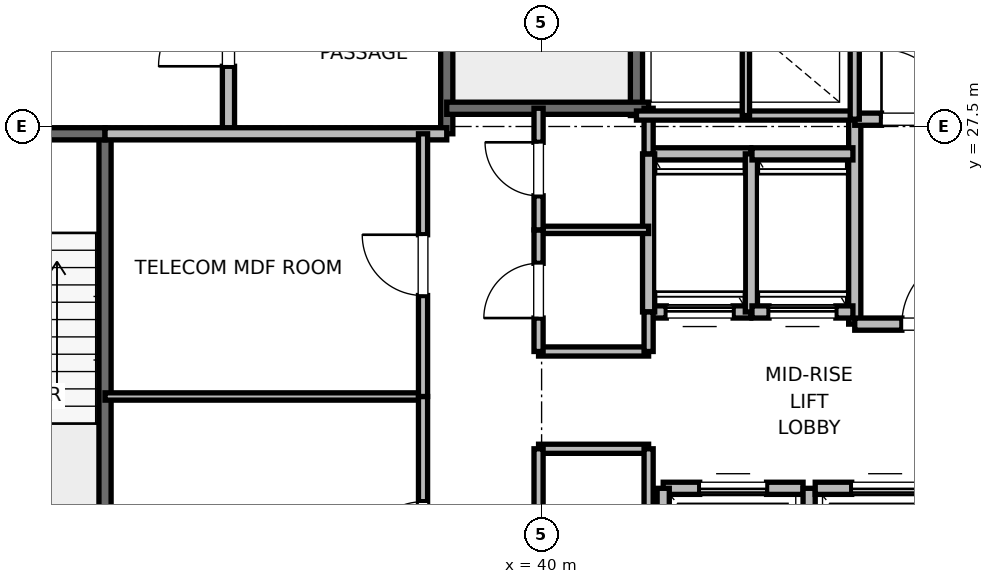
"""IFC4 building model, lengths in metres.
Left out: names, types, materials, properties, quantities, classifications, styles, units other than length and angle.
Written with IfcOpenShell. Run it as: python <this file> out.ifc"""

import sys

from ifc_helpers import new_model, si_unit, direction, frame, frame_2d, origin, place, context, subcontext, project, spatial, rectangle, extrude, element, fill, save


model = new_model("IFC4")
c1 = context("Model", 3, precision=1e-05, world=origin(), true_north=direction((0.0, 1.0)))
c2 = subcontext(c1, "Body", "Model", "MODEL_VIEW")
j1 = project(units=[si_unit("LENGTHUNIT", "METRE"), si_unit("PLANEANGLEUNIT", "RADIAN")], contexts=[c1])
p1 = place(None, origin())
s1 = spatial("IfcSite", under=j1, at=p1, CompositionType="ELEMENT")
p2 = place(p1, origin())
s2 = spatial("IfcBuilding", under=s1, at=p2, CompositionType="ELEMENT")
p3 = place(p2, frame((0.0, 0.0, 156.4)))
s3 = spatial("IfcBuildingStorey", under=s2, at=p3, CompositionType="ELEMENT", Elevation=156.4)
p4 = place(p3, frame((32.82, 18.6, 0.0), z_axis=(0.0, 0.0, 1.0), x_axis=(0.0, 1.0, 0.0)))
e1 = element("IfcWall", 1, at=p4, inside=s3, PredefinedType="SOLIDWALL", context=c2, shape_type="SweptSolid", body=[
    extrude(rectangle(XDim=8.78, YDim=0.2, at=frame_2d((4.39, 0.0))), origin(), (0.0, 0.0, 1.0), 3.775),
])
p5 = place(p3, frame((29.7, 27.38, 0.0), z_axis=(0.0, 0.0, 1.0), x_axis=(1.0, 0.0, 0.0)))
e2 = element("IfcWall", 2, at=p5, inside=s3, PredefinedType="SOLIDWALL", context=c2, shape_type="SweptSolid", body=[
    extrude(rectangle(XDim=3.12, YDim=0.2, at=frame_2d((1.56, 0.0))), origin(), (0.0, 0.0, 1.0), 3.775),
])
p6 = place(p5, frame((1.01, 0.0, 0.0)))
e3 = element("IfcOpeningElement", 3, at=p6, cuts=e2, PredefinedType="OPENING", context=c2, shape_type="SweptSolid", body=[
    extrude(rectangle(XDim=1.1, YDim=2.15, at=frame_2d((0.55, 1.075))), frame((0.0, 0.1, 0.0), z_axis=(0.0, -1.0, 0.0), x_axis=(1.0, 0.0, 0.0)), (0.0, 0.0, 1.0), 0.2),
])
p7 = place(p3, frame((38.44, 27.38, 0.0), z_axis=(0.0, 0.0, 1.0), x_axis=(0.0, 1.0, 0.0)))
e4 = element("IfcWall", 4, at=p7, inside=s3, PredefinedType="SOLIDWALL", context=c2, shape_type="SweptSolid", body=[
    extrude(rectangle(XDim=8.87, YDim=0.2, at=frame_2d((4.435, 0.0))), origin(), (0.0, 0.0, 1.0), 3.775),
])
p8 = place(p3, frame((41.56, 27.68, 0.0), z_axis=(0.0, 0.0, 1.0), x_axis=(0.0, 1.0, 0.0)))
e5 = element("IfcWall", 5, at=p8, inside=s3, PredefinedType="SOLIDWALL", context=c2, shape_type="SweptSolid", body=[
    extrude(rectangle(XDim=8.57, YDim=0.2, at=frame_2d((4.285, 0.0))), origin(), (0.0, 0.0, 1.0), 3.775),
])
p9 = place(p3, frame((38.44, 27.8, 0.0), z_axis=(0.0, 0.0, 1.0), x_axis=(1.0, 0.0, 0.0)))
e6 = element("IfcWall", 6, at=p9, inside=s3, PredefinedType="SOLIDWALL", context=c2, shape_type="SweptSolid", body=[
    extrude(rectangle(XDim=3.32, YDim=0.2, at=frame_2d((1.66, 0.0))), origin(), (0.0, 0.0, 1.0), 3.775),
])
p10 = place(p3, frame((34.85, 27.38, 0.0), z_axis=(0.0, 0.0, 1.0), x_axis=(0.0, 1.0, 0.0)))
e7 = element("IfcWall", 7, at=p10, inside=s3, PredefinedType="PARTITIONING", context=c2, shape_type="SweptSolid", body=[
    extrude(rectangle(XDim=3.37, YDim=0.2, at=frame_2d((1.685, 0.0))), origin(), (0.0, 0.0, 1.0), 3.775),
])
p11 = place(p10, frame((1.11, 0.0, 0.0)))
e8 = element("IfcOpeningElement", 8, at=p11, cuts=e7, PredefinedType="OPENING", context=c2, shape_type="SweptSolid", body=[
    extrude(rectangle(XDim=1.15, YDim=2.2, at=frame_2d((0.575, 1.1))), frame((0.0, 0.1, 0.0), z_axis=(0.0, -1.0, 0.0), x_axis=(1.0, 0.0, 0.0)), (0.0, 0.0, 1.0), 0.2),
])
p12 = place(p3, frame((32.82, 27.38, 0.0), z_axis=(0.0, 0.0, 1.0), x_axis=(1.0, 0.0, 0.0)))
e9 = element("IfcWall", 9, at=p12, inside=s3, PredefinedType="PARTITIONING", context=c2, shape_type="SweptSolid", body=[
    extrude(rectangle(XDim=5.62, YDim=0.2, at=frame_2d((2.81, 0.0))), origin(), (0.0, 0.0, 1.0), 3.775),
])
p13 = place(p3, frame((45.15, 24.25, 0.0), z_axis=(0.0, 0.0, 1.0), x_axis=(0.0, 1.0, 0.0)))
e10 = element("IfcWall", 10, at=p13, inside=s3, PredefinedType="PARTITIONING", context=c2, shape_type="SweptSolid", body=[
    extrude(rectangle(XDim=3.37, YDim=0.2, at=frame_2d((1.685, 0.0))), origin(), (0.0, 0.0, 1.0), 3.775),
])
p14 = place(p3, frame((45.15, 24.25, 0.0), z_axis=(0.0, 0.0, 1.0), x_axis=(1.0, 0.0, 0.0)))
e11 = element("IfcWall", 11, at=p14, inside=s3, PredefinedType="PARTITIONING", context=c2, shape_type="SweptSolid", body=[
    extrude(rectangle(XDim=2.7, YDim=0.2, at=frame_2d((1.35, 0.0))), origin(), (0.0, 0.0, 1.0), 3.775),
])
p15 = place(p14, frame((0.775, 0.0, 0.0)))
e12 = element("IfcOpeningElement", 12, at=p15, cuts=e11, PredefinedType="OPENING", context=c2, shape_type="SweptSolid", body=[
    extrude(rectangle(XDim=1.15, YDim=2.2, at=frame_2d((0.575, 1.1))), frame((0.0, 0.1, 0.0), z_axis=(0.0, -1.0, 0.0), x_axis=(1.0, 0.0, 0.0)), (0.0, 0.0, 1.0), 0.2),
])
p16 = place(p3, frame((45.15, 27.62, 0.0), z_axis=(0.0, 0.0, 1.0), x_axis=(1.0, 0.0, 0.0)))
e13 = element("IfcWall", 13, at=p16, inside=s3, PredefinedType="PARTITIONING", context=c2, shape_type="SweptSolid", body=[
    extrude(rectangle(XDim=2.03, YDim=0.2, at=frame_2d((1.015, 0.0))), origin(), (0.0, 0.0, 1.0), 3.775),
])
p17 = place(p16, frame((0.44, 0.0, 0.0)))
e14 = element("IfcOpeningElement", 14, at=p17, cuts=e13, PredefinedType="OPENING", context=c2, shape_type="SweptSolid", body=[
    extrude(rectangle(XDim=1.15, YDim=2.2, at=frame_2d((0.575, 1.1))), frame((0.0, 0.1, 0.0), z_axis=(0.0, -1.0, 0.0), x_axis=(1.0, 0.0, 0.0)), (0.0, 0.0, 1.0), 0.2),
])
p18 = place(p3, frame((44.3, 21.55, 0.0), z_axis=(0.0, 0.0, 1.0), x_axis=(-1.0, 0.0, 0.0)))
e15 = element("IfcWall", 15, at=p18, inside=s3, PredefinedType="SOLIDWALL", context=c2, shape_type="SweptSolid", body=[
    extrude(rectangle(XDim=2.3, YDim=0.2, at=frame_2d((1.15, 0.0))), origin(), (0.0, 0.0, 1.0), 3.775),
])
p19 = place(p18, frame((0.6, 0.0, 0.0)))
e16 = element("IfcOpeningElement", 16, at=p19, cuts=e15, PredefinedType="OPENING", context=c2, shape_type="SweptSolid", body=[
    extrude(rectangle(XDim=1.1, YDim=2.2, at=frame_2d((0.55, 1.1))), frame((0.0, 0.1, 0.0), z_axis=(0.0, -1.0, 0.0), x_axis=(1.0, 0.0, 0.0)), (0.0, 0.0, 1.0), 0.2),
])
p20 = place(p3, frame((42.0, 21.55, 0.0), z_axis=(0.0, 0.0, 1.0), x_axis=(0.0, -1.0, 0.0)))
e17 = element("IfcWall", 17, at=p20, inside=s3, PredefinedType="SOLIDWALL", context=c2, shape_type="SweptSolid", body=[
    extrude(rectangle(XDim=2.6, YDim=0.2, at=frame_2d((1.3, 0.0))), origin(), (0.0, 0.0, 1.0), 2.755),
])
p21 = place(p3, frame((44.4, 18.95, 0.0), z_axis=(0.0, 0.0, 1.0), x_axis=(0.0, 1.0, 0.0)))
e18 = element("IfcWall", 18, at=p21, inside=s3, PredefinedType="SOLIDWALL", context=c2, shape_type="SweptSolid", body=[
    extrude(rectangle(XDim=2.6, YDim=0.2, at=frame_2d((1.3, 0.0))), origin(), (0.0, 0.0, 1.0), 3.775),
])
p22 = place(p3, frame((46.8, 21.55, 0.0), z_axis=(0.0, 0.0, 1.0), x_axis=(-1.0, 0.0, 0.0)))
e19 = element("IfcWall", 19, at=p22, inside=s3, PredefinedType="SOLIDWALL", context=c2, shape_type="SweptSolid", body=[
    extrude(rectangle(XDim=2.3, YDim=0.2, at=frame_2d((1.15, 0.0))), origin(), (0.0, 0.0, 1.0), 3.775),
])
p23 = place(p22, frame((0.6, 0.0, 0.0)))
e20 = element("IfcOpeningElement", 20, at=p23, cuts=e19, PredefinedType="OPENING", context=c2, shape_type="SweptSolid", body=[
    extrude(rectangle(XDim=1.1, YDim=2.2, at=frame_2d((0.55, 1.1))), frame((0.0, 0.1, 0.0), z_axis=(0.0, -1.0, 0.0), x_axis=(1.0, 0.0, 0.0)), (0.0, 0.0, 1.0), 0.2),
])
p24 = place(p3, frame((41.76, 24.45, 0.0), z_axis=(0.0, 0.0, 1.0), x_axis=(1.0, 0.0, 0.0)))
e21 = element("IfcWall", 21, at=p24, inside=s3, PredefinedType="SOLIDWALL", context=c2, shape_type="SweptSolid", body=[
    extrude(rectangle(XDim=1.68, YDim=0.2, at=frame_2d((0.84, 0.0))), origin(), (0.0, 0.0, 1.0), 3.775),
])
p25 = place(p24, frame((0.29, 0.0, 0.0)))
e22 = element("IfcOpeningElement", 22, at=p25, cuts=e21, PredefinedType="OPENING", context=c2, shape_type="SweptSolid", body=[
    extrude(rectangle(XDim=1.1, YDim=2.2, at=frame_2d((0.55, 1.1))), frame((0.0, 0.1, 0.0), z_axis=(0.0, -1.0, 0.0), x_axis=(1.0, 0.0, 0.0)), (0.0, 0.0, 1.0), 0.2),
])
p26 = place(p3, frame((43.44, 27.05, 0.0), z_axis=(0.0, 0.0, 1.0), x_axis=(-1.0, 0.0, 0.0)))
e23 = element("IfcWall", 23, at=p26, inside=s3, PredefinedType="SOLIDWALL", context=c2, shape_type="SweptSolid", body=[
    extrude(rectangle(XDim=1.68, YDim=0.2, at=frame_2d((0.84, 0.0))), origin(), (0.0, 0.0, 1.0), 3.775),
])
for number, where, z_axis, x_axis in (
    (24, (41.76, 27.05, 0.0), (0.0, 0.0, 1.0), (0.0, -1.0, 0.0)),
    (25, (43.45, 24.45, 0.0), (0.0, 0.0, 1.0), (0.0, 1.0, 0.0)),
):
    element("IfcWall", number, at=place(p3, frame(where, z_axis=z_axis, x_axis=x_axis)), inside=s3, PredefinedType="SOLIDWALL", context=c2, shape_type="SweptSolid", body=[
        extrude(rectangle(XDim=2.6, YDim=0.2, at=frame_2d((1.3, 0.0))), origin(), (0.0, 0.0, 1.0), 3.775),
    ])
p27 = place(p3, frame((43.46, 24.45, 0.0), z_axis=(0.0, 0.0, 1.0), x_axis=(1.0, 0.0, 0.0)))
e26 = element("IfcWall", 26, at=p27, inside=s3, PredefinedType="SOLIDWALL", context=c2, shape_type="SweptSolid", body=[
    extrude(rectangle(XDim=1.66, YDim=0.2, at=frame_2d((0.83, 0.0))), origin(), (0.0, 0.0, 1.0), 3.775),
])
p28 = place(p27, frame((0.28, 0.0, 0.0)))
e27 = element("IfcOpeningElement", 27, at=p28, cuts=e26, PredefinedType="OPENING", context=c2, shape_type="SweptSolid", body=[
    extrude(rectangle(XDim=1.1, YDim=2.2, at=frame_2d((0.55, 1.1))), frame((0.0, 0.1, 0.0), z_axis=(0.0, -1.0, 0.0), x_axis=(1.0, 0.0, 0.0)), (0.0, 0.0, 1.0), 0.2),
])
p29 = place(p3, frame((45.12, 27.05, 0.0), z_axis=(0.0, 0.0, 1.0), x_axis=(-1.0, 0.0, 0.0)))
e28 = element("IfcWall", 28, at=p29, inside=s3, PredefinedType="SOLIDWALL", context=c2, shape_type="SweptSolid", body=[
    extrude(rectangle(XDim=1.66, YDim=0.2, at=frame_2d((0.83, 0.0))), origin(), (0.0, 0.0, 1.0), 3.775),
])
for number, where, z_axis, x_axis in (
    (29, (39.95, 22.2, 0.0), (0.0, 0.0, 1.0), (1.0, 0.0, 0.0)),
    (30, (39.95, 23.8, 0.0), (0.0, 0.0, 1.0), (1.0, 0.0, 0.0)),
):
    element("IfcWall", number, at=place(p3, frame(where, z_axis=z_axis, x_axis=x_axis)), inside=s3, PredefinedType="PARTITIONING", context=c2, shape_type="SweptSolid", body=[
        extrude(rectangle(XDim=1.81, YDim=0.15, at=frame_2d((0.905, 0.0))), origin(), (0.0, 0.0, 1.0), 2.85),
    ])
p30 = place(p3, frame((39.95, 25.8, 0.0), z_axis=(0.0, 0.0, 1.0), x_axis=(1.0, 0.0, 0.0)))
e31 = element("IfcWall", 31, at=p30, inside=s3, PredefinedType="PARTITIONING", context=c2, shape_type="SweptSolid", body=[
    extrude(rectangle(XDim=1.81, YDim=0.12, at=frame_2d((0.905, 0.0))), origin(), (0.0, 0.0, 1.0), 2.85),
])
p31 = place(p3, frame((41.76, 18.6, 0.0), z_axis=(0.0, 0.0, 1.0), x_axis=(0.0, 1.0, 0.0)))
e32 = element("IfcWall", 32, at=p31, inside=s3, PredefinedType="PARTITIONING", context=c2, shape_type="SweptSolid", body=[
    extrude(rectangle(XDim=3.6, YDim=0.15, at=frame_2d((1.8, 0.0))), origin(), (0.0, 0.0, 1.0), 2.755),
])
p32 = place(p3, frame((41.76, 23.8, 0.0), z_axis=(0.0, 0.0, 1.0), x_axis=(0.0, 1.0, 0.0)))
e33 = element("IfcWall", 33, at=p32, inside=s3, PredefinedType="PARTITIONING", context=c2, shape_type="SweptSolid", body=[
    extrude(rectangle(XDim=0.65, YDim=0.15, at=frame_2d((0.325, 0.0))), origin(), (0.0, 0.0, 1.0), 2.85),
])
p33 = place(p3, frame((41.76, 27.05, 0.0), z_axis=(0.0, 0.0, 1.0), x_axis=(0.0, 1.0, 0.0)))
e34 = element("IfcWall", 34, at=p33, inside=s3, PredefinedType="PARTITIONING", context=c2, shape_type="SweptSolid", body=[
    extrude(rectangle(XDim=0.75, YDim=0.15, at=frame_2d((0.375, 0.0))), origin(), (0.0, 0.0, 1.0), 2.85),
])
p34 = place(p3, frame((39.95, 19.2, 0.0), z_axis=(0.0, 0.0, 1.0), x_axis=(0.0, 1.0, 0.0)))
e35 = element("IfcWall", 35, at=p34, inside=s3, PredefinedType="PARTITIONING", context=c2, shape_type="SweptSolid", body=[
    extrude(rectangle(XDim=3.0, YDim=0.15, at=frame_2d((1.5, 0.0))), origin(), (0.0, 0.0, 1.0), 2.85),
])
p35 = place(p34, frame((1.05, 0.0, 0.0)))
e36 = element("IfcOpeningElement", 36, at=p35, cuts=e35, PredefinedType="OPENING", context=c2, shape_type="SweptSolid", body=[
    extrude(rectangle(XDim=0.9, YDim=2.1, at=frame_2d((0.45, 1.05))), frame((0.0, 0.075, 0.0), z_axis=(0.0, -1.0, 0.0), x_axis=(1.0, 0.0, 0.0)), (0.0, 0.0, 1.0), 0.15),
])
p36 = place(p3, frame((39.95, 23.8, 0.0), z_axis=(0.0, 0.0, 1.0), x_axis=(0.0, 1.0, 0.0)))
e37 = element("IfcWall", 37, at=p36, inside=s3, PredefinedType="PARTITIONING", context=c2, shape_type="SweptSolid", body=[
    extrude(rectangle(XDim=2.0, YDim=0.15, at=frame_2d((1.0, 0.0))), origin(), (0.0, 0.0, 1.0), 2.85),
])
p37 = place(p36, frame((0.55, 0.0, 0.0)))
e38 = element("IfcOpeningElement", 38, at=p37, cuts=e37, PredefinedType="OPENING", context=c2, shape_type="SweptSolid", body=[
    extrude(rectangle(XDim=0.9, YDim=2.1, at=frame_2d((0.45, 1.05))), frame((0.0, 0.075, 0.0), z_axis=(0.0, -1.0, 0.0), x_axis=(1.0, 0.0, 0.0)), (0.0, 0.0, 1.0), 0.15),
])
p38 = place(p3, frame((39.95, 25.8, 0.0), z_axis=(0.0, 0.0, 1.0), x_axis=(0.0, 1.0, 0.0)))
e39 = element("IfcWall", 39, at=p38, inside=s3, PredefinedType="PARTITIONING", context=c2, shape_type="SweptSolid", body=[
    extrude(rectangle(XDim=2.0, YDim=0.15, at=frame_2d((1.0, 0.0))), origin(), (0.0, 0.0, 1.0), 2.85),
])
p39 = place(p38, frame((0.56, 0.0, 0.0)))
e40 = element("IfcOpeningElement", 40, at=p39, cuts=e39, PredefinedType="OPENING", context=c2, shape_type="SweptSolid", body=[
    extrude(rectangle(XDim=0.88, YDim=2.1, at=frame_2d((0.44, 1.05))), frame((0.0, 0.075, 0.0), z_axis=(0.0, -1.0, 0.0), x_axis=(1.0, 0.0, 0.0)), (0.0, 0.0, 1.0), 0.15),
])
p40 = place(p3, frame((32.82, 23.06, 0.0), z_axis=(0.0, 0.0, 1.0), x_axis=(1.0, 0.0, 0.0)))
e41 = element("IfcWall", 41, at=p40, inside=s3, PredefinedType="PARTITIONING", context=c2, shape_type="SweptSolid", body=[
    extrude(rectangle(XDim=5.23, YDim=0.12, at=frame_2d((2.615, 0.0))), origin(), (0.0, 0.0, 1.0), 2.85),
])
p41 = place(p3, frame((38.05, 18.6, 0.0), z_axis=(0.0, 0.0, 1.0), x_axis=(0.0, 1.0, 0.0)))
e42 = element("IfcWall", 42, at=p41, inside=s3, PredefinedType="PARTITIONING", context=c2, shape_type="SweptSolid", body=[
    extrude(rectangle(XDim=4.46, YDim=0.15, at=frame_2d((2.23, 0.0))), origin(), (0.0, 0.0, 1.0), 2.755),
])
p42 = place(p41, frame((1.73, 0.0, 0.0)))
e43 = element("IfcOpeningElement", 43, at=p42, cuts=e42, PredefinedType="OPENING", context=c2, shape_type="SweptSolid", body=[
    extrude(rectangle(XDim=1.0, YDim=2.15, at=frame_2d((0.5, 1.075))), frame((0.0, 0.075, 0.0), z_axis=(0.0, -1.0, 0.0), x_axis=(1.0, 0.0, 0.0)), (0.0, 0.0, 1.0), 0.15),
])
p43 = place(p3, frame((38.05, 23.06, 0.0), z_axis=(0.0, 0.0, 1.0), x_axis=(0.0, 1.0, 0.0)))
e44 = element("IfcWall", 44, at=p43, inside=s3, PredefinedType="PARTITIONING", context=c2, shape_type="SweptSolid", body=[
    extrude(rectangle(XDim=4.32, YDim=0.15, at=frame_2d((2.16, 0.0))), origin(), (0.0, 0.0, 1.0), 2.85),
])
p44 = place(p43, frame((1.66, 0.0, 0.0)))
e45 = element("IfcOpeningElement", 45, at=p44, cuts=e44, PredefinedType="OPENING", context=c2, shape_type="SweptSolid", body=[
    extrude(rectangle(XDim=1.0, YDim=2.15, at=frame_2d((0.5, 1.075))), frame((0.0, 0.075, 0.0), z_axis=(0.0, -1.0, 0.0), x_axis=(1.0, 0.0, 0.0)), (0.0, 0.0, 1.0), 0.15),
])
p45 = place(p3, frame((41.56, 27.68, 0.0), z_axis=(0.0, 0.0, 1.0), x_axis=(1.0, 0.0, 0.0)))
e46 = element("IfcWall", 46, at=p45, inside=s3, PredefinedType="PARTITIONING", context=c2, shape_type="SweptSolid", body=[
    extrude(rectangle(XDim=3.59, YDim=0.15, at=frame_2d((1.795, 0.0))), origin(), (0.0, 0.0, 1.0), 2.85),
])
p46 = place(p3, frame((45.15, 27.62, 0.0), z_axis=(0.0, 0.0, 1.0), x_axis=(0.0, 1.0, 0.0)))
e47 = element("IfcWall", 47, at=p46, inside=s3, PredefinedType="PARTITIONING", context=c2, shape_type="SweptSolid", body=[
    extrude(rectangle(XDim=3.1, YDim=0.15, at=frame_2d((1.55, 0.0))), origin(), (0.0, 0.0, 1.0), 2.85),
])
p47 = place(p3, frame((43.36, 27.68, 0.0), z_axis=(0.0, 0.0, 1.0), x_axis=(0.0, 1.0, 0.0)))
e48 = element("IfcWall", 48, at=p47, inside=s3, PredefinedType="PARTITIONING", context=c2, shape_type="SweptSolid", body=[
    extrude(rectangle(XDim=3.04, YDim=0.12, at=frame_2d((1.52, 0.0))), origin(), (0.0, 0.0, 1.0), 2.85),
])
p48 = place(p11, origin())
e49 = element("IfcDoor", 49, at=p48, inside=s3, OperationType="SINGLE_SWING_LEFT", PredefinedType="DOOR", context=c2, shape_type="SweptSolid", body=[
    extrude(rectangle(XDim=1.15, YDim=2.2, at=frame_2d((0.575, 1.1))), frame((0.0, 0.025, 0.0), z_axis=(0.0, -1.0, 0.0), x_axis=(1.0, 0.0, 0.0)), (0.0, 0.0, 1.0), 0.05),
])
fill(e8, e49)
p49 = place(p15, origin())
e50 = element("IfcDoor", 50, at=p49, inside=s3, OperationType="SINGLE_SWING_RIGHT", PredefinedType="DOOR", context=c2, shape_type="SweptSolid", body=[
    extrude(rectangle(XDim=1.15, YDim=2.2, at=frame_2d((0.575, 1.1))), frame((0.0, 0.025, 0.0), z_axis=(0.0, -1.0, 0.0), x_axis=(1.0, 0.0, 0.0)), (0.0, 0.0, 1.0), 0.05),
])
fill(e12, e50)
p50 = place(p17, origin())
e51 = element("IfcDoor", 51, at=p50, inside=s3, OperationType="SINGLE_SWING_LEFT", PredefinedType="DOOR", context=c2, shape_type="SweptSolid", body=[
    extrude(rectangle(XDim=1.15, YDim=2.2, at=frame_2d((0.575, 1.1))), frame((0.0, 0.025, 0.0), z_axis=(0.0, -1.0, 0.0), x_axis=(1.0, 0.0, 0.0)), (0.0, 0.0, 1.0), 0.05),
])
fill(e14, e51)
p51 = place(p19, origin())
e52 = element("IfcDoor", 52, at=p51, inside=s3, OperationType="SLIDING_TO_RIGHT", PredefinedType="DOOR", context=c2, shape_type="SweptSolid", body=[
    extrude(rectangle(XDim=1.1, YDim=2.2, at=frame_2d((0.55, 1.1))), frame((0.0, 0.025, 0.0), z_axis=(0.0, -1.0, 0.0), x_axis=(1.0, 0.0, 0.0)), (0.0, 0.0, 1.0), 0.05),
])
fill(e16, e52)
p52 = place(p23, origin())
e53 = element("IfcDoor", 53, at=p52, inside=s3, OperationType="SLIDING_TO_RIGHT", PredefinedType="DOOR", context=c2, shape_type="SweptSolid", body=[
    extrude(rectangle(XDim=1.1, YDim=2.2, at=frame_2d((0.55, 1.1))), frame((0.0, 0.025, 0.0), z_axis=(0.0, -1.0, 0.0), x_axis=(1.0, 0.0, 0.0)), (0.0, 0.0, 1.0), 0.05),
])
fill(e20, e53)
p53 = place(p25, origin())
e54 = element("IfcDoor", 54, at=p53, inside=s3, OperationType="SLIDING_TO_RIGHT", PredefinedType="DOOR", context=c2, shape_type="SweptSolid", body=[
    extrude(rectangle(XDim=1.1, YDim=2.2, at=frame_2d((0.55, 1.1))), frame((0.0, 0.025, 0.0), z_axis=(0.0, -1.0, 0.0), x_axis=(1.0, 0.0, 0.0)), (0.0, 0.0, 1.0), 0.05),
])
fill(e22, e54)
p54 = place(p28, origin())
e55 = element("IfcDoor", 55, at=p54, inside=s3, OperationType="SLIDING_TO_RIGHT", PredefinedType="DOOR", context=c2, shape_type="SweptSolid", body=[
    extrude(rectangle(XDim=1.1, YDim=2.2, at=frame_2d((0.55, 1.1))), frame((0.0, 0.025, 0.0), z_axis=(0.0, -1.0, 0.0), x_axis=(1.0, 0.0, 0.0)), (0.0, 0.0, 1.0), 0.05),
])
fill(e27, e55)
p55 = place(p37, origin())
e56 = element("IfcDoor", 56, at=p55, inside=s3, OperationType="SINGLE_SWING_LEFT", PredefinedType="DOOR", context=c2, shape_type="SweptSolid", body=[
    extrude(rectangle(XDim=0.9, YDim=2.1, at=frame_2d((0.45, 1.05))), frame((0.0, 0.025, 0.0), z_axis=(0.0, -1.0, 0.0), x_axis=(1.0, 0.0, 0.0)), (0.0, 0.0, 1.0), 0.05),
])
fill(e38, e56)
p56 = place(p39, origin())
e57 = element("IfcDoor", 57, at=p56, inside=s3, OperationType="SINGLE_SWING_RIGHT", PredefinedType="DOOR", context=c2, shape_type="SweptSolid", body=[
    extrude(rectangle(XDim=0.88, YDim=2.1, at=frame_2d((0.44, 1.05))), frame((0.0, 0.025, 0.0), z_axis=(0.0, -1.0, 0.0), x_axis=(1.0, 0.0, 0.0)), (0.0, 0.0, 1.0), 0.05),
])
fill(e40, e57)
p57 = place(p42, origin())
e58 = element("IfcDoor", 58, at=p57, inside=s3, OperationType="SINGLE_SWING_LEFT", PredefinedType="DOOR", context=c2, shape_type="SweptSolid", body=[
    extrude(rectangle(XDim=1.0, YDim=2.15, at=frame_2d((0.5, 1.075))), frame((0.0, 0.025, 0.0), z_axis=(0.0, -1.0, 0.0), x_axis=(1.0, 0.0, 0.0)), (0.0, 0.0, 1.0), 0.05),
])
fill(e43, e58)
p58 = place(p44, origin())
e59 = element("IfcDoor", 59, at=p58, inside=s3, OperationType="SINGLE_SWING_RIGHT", PredefinedType="DOOR", context=c2, shape_type="SweptSolid", body=[
    extrude(rectangle(XDim=1.0, YDim=2.15, at=frame_2d((0.5, 1.075))), frame((0.0, 0.025, 0.0), z_axis=(0.0, -1.0, 0.0), x_axis=(1.0, 0.0, 0.0)), (0.0, 0.0, 1.0), 0.05),
])
fill(e45, e59)
save(model, sys.argv[1])
